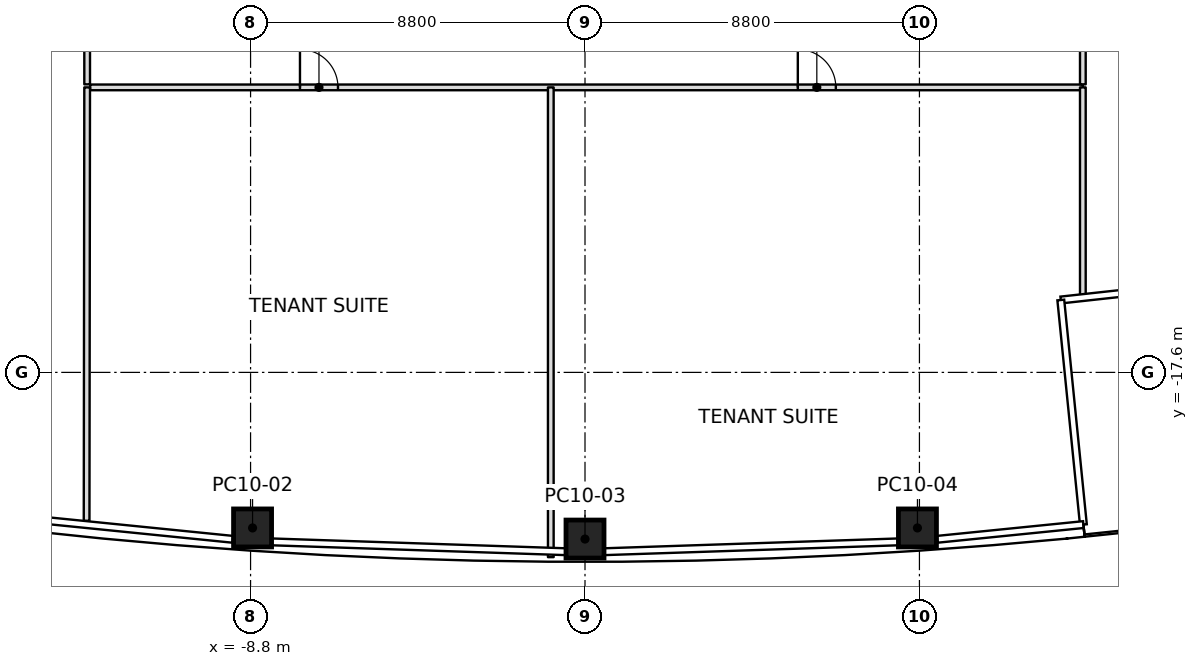
"""IFC4 building model, lengths in metres.
Left out: names, types, materials, properties, quantities, classifications, styles, units other than length and angle.
Written with IfcOpenShell. Run it as: python <this file> out.ifc"""

import sys

from ifc_helpers import new_model, si_unit, direction, frame, frame_2d, origin, origin_2d, place, context, subcontext, project, spatial, rectangle, extrude, clip, halfspace, element, fill, save


model = new_model("IFC4")
c1 = context("Model", 3, precision=1e-05, world=origin(), true_north=direction((0.0, 1.0)))
c2 = subcontext(c1, "Body", "Model", "MODEL_VIEW")
j1 = project(units=[si_unit("LENGTHUNIT", "METRE"), si_unit("PLANEANGLEUNIT", "RADIAN")], contexts=[c1])
p1 = place(None, origin())
s1 = spatial("IfcSite", under=j1, at=p1, CompositionType="ELEMENT")
p2 = place(p1, origin())
s2 = spatial("IfcBuilding", under=s1, at=p2, CompositionType="ELEMENT")
p3 = place(p2, frame((0.0, 0.0, 125.8)))
s3 = spatial("IfcBuildingStorey", under=s2, at=p3, CompositionType="ELEMENT", Elevation=125.8)
p4 = place(p3, frame((-8.748, -21.693, 0.0), z_axis=(0.008910223283, 0.011168293567, 0.999897933361), x_axis=(-0.997726322898, 0.066901914225, 0.008143615286)))
e1 = element("IfcColumn", 1, at=p4, inside=s3, PredefinedType="COLUMN", context=c2, shape_type="SweptSolid", body=[
    clip(extrude(rectangle(XDim=1.0, YDim=1.0, at=origin_2d()), origin(), (0.0, 0.0, 1.0), 4.0), halfspace(frame((0.0, 0.0, 0.002)), True)),
])
p5 = place(p3, frame((0.0, -21.986, 0.0), z_axis=(0.0, 0.01141283087, 0.999934871525), x_axis=(1.0, 0.0, 0.0)))
e2 = element("IfcColumn", 2, at=p5, inside=s3, PredefinedType="COLUMN", context=c2, shape_type="SweptSolid", body=[
    clip(extrude(rectangle(XDim=1.0, YDim=1.0, at=origin_2d()), origin(), (0.0, 0.0, 1.0), 4.0), halfspace(frame((0.0, 0.0, 0.002)), True)),
])
p6 = place(p3, frame((8.748, -21.693, 0.0), z_axis=(-0.008910223283, 0.011168293567, 0.999897933361), x_axis=(0.997726322898, 0.066901914225, 0.008143615286)))
e3 = element("IfcColumn", 3, at=p6, inside=s3, PredefinedType="COLUMN", context=c2, shape_type="SweptSolid", body=[
    clip(extrude(rectangle(XDim=1.0, YDim=1.0, at=origin_2d()), origin(), (0.0, 0.0, 1.0), 4.0), halfspace(frame((0.0, 0.0, 0.002)), True)),
])
p7 = place(p3, frame((-13.1, -10.1, 0.0), z_axis=(0.0, 0.0, 1.0), x_axis=(-0.001241543696, -0.999999229284, 0.0)))
e4 = element("IfcWall", 4, at=p7, inside=s3, PredefinedType="PARTITIONING", context=c2, shape_type="SweptSolid", body=[
    extrude(rectangle(XDim=11.405, YDim=0.15, at=frame_2d((5.703, 0.0))), origin(), (0.0, 0.0, 1.0), 3.234),
])
p8 = place(p3, frame((-0.9, -10.1, 0.0), z_axis=(0.0, 0.0, 1.0), x_axis=(0.0, -1.0, 0.0)))
e5 = element("IfcWall", 5, at=p8, inside=s3, PredefinedType="PARTITIONING", context=c2, shape_type="SweptSolid", body=[
    extrude(rectangle(XDim=12.362, YDim=0.15, at=frame_2d((6.181, 0.0))), origin(), (0.0, 0.0, 1.0), 3.234),
])
p9 = place(p3, frame((13.1, -10.1, 0.0), z_axis=(0.0, 0.0, 1.0), x_axis=(0.0, -1.0, 0.0)))
e6 = element("IfcWall", 6, at=p9, inside=s3, PredefinedType="PARTITIONING", context=c2, shape_type="SweptSolid", body=[
    extrude(rectangle(XDim=5.545, YDim=0.15, at=frame_2d((2.772, 0.0))), origin(), (0.0, 0.0, 1.0), 3.45),
])
p10 = place(p3, frame((-13.1, 10.02, 0.0), z_axis=(0.0, 0.0, 1.0), x_axis=(0.0, -1.0, 0.0)))
e7 = element("IfcWall", 7, at=p10, inside=s3, PredefinedType="PARTITIONING", context=c2, shape_type="SweptSolid", body=[
    extrude(rectangle(XDim=20.04, YDim=0.15, at=frame_2d((10.02, 0.0))), origin(), (0.0, 0.0, 1.0), 3.166),
])
p11 = place(p10, frame((2.52, 0.0, 0.0)))
e8 = element("IfcOpeningElement", 8, at=p11, cuts=e7, PredefinedType="OPENING", context=c2, shape_type="SweptSolid", body=[
    extrude(rectangle(XDim=1.0, YDim=2.1, at=frame_2d((0.5, 1.05))), frame((0.0, 0.075, 0.0), z_axis=(0.0, -1.0, 0.0), x_axis=(1.0, 0.0, 0.0)), (0.0, 0.0, 1.0), 0.15),
])
p12 = place(p10, frame((7.47, 0.0, 0.0)))
e9 = element("IfcOpeningElement", 9, at=p12, cuts=e7, PredefinedType="OPENING", context=c2, shape_type="SweptSolid", body=[
    extrude(rectangle(XDim=0.9, YDim=2.1, at=frame_2d((0.45, 1.05))), frame((0.0, 0.075, 0.0), z_axis=(0.0, -1.0, 0.0), x_axis=(1.0, 0.0, 0.0)), (0.0, 0.0, 1.0), 0.15),
])
p13 = place(p10, frame((14.48, 0.0, 0.0)))
e10 = element("IfcOpeningElement", 10, at=p13, cuts=e7, PredefinedType="OPENING", context=c2, shape_type="SweptSolid", body=[
    extrude(rectangle(XDim=1.0, YDim=2.1, at=frame_2d((0.5, 1.05))), frame((0.0, 0.075, 0.0), z_axis=(0.0, -1.0, 0.0), x_axis=(1.0, 0.0, 0.0)), (0.0, 0.0, 1.0), 0.15),
])
p14 = place(p3, frame((-13.02, -10.1, 0.0), z_axis=(0.0, 0.0, 1.0), x_axis=(1.0, 0.0, 0.0)))
e11 = element("IfcWall", 11, at=p14, inside=s3, PredefinedType="PARTITIONING", context=c2, shape_type="SweptSolid", body=[
    extrude(rectangle(XDim=26.12, YDim=0.15, at=frame_2d((13.06, 0.0))), origin(), (0.0, 0.0, 1.0), 3.317),
])
p15 = place(p14, frame((5.52, 0.0, 0.0)))
e12 = element("IfcOpeningElement", 12, at=p15, cuts=e11, PredefinedType="OPENING", context=c2, shape_type="SweptSolid", body=[
    extrude(rectangle(XDim=1.0, YDim=2.1, at=frame_2d((0.5, 1.05))), frame((0.0, 0.075, 0.0), z_axis=(0.0, -1.0, 0.0), x_axis=(1.0, 0.0, 0.0)), (0.0, 0.0, 1.0), 0.15),
])
p16 = place(p14, frame((18.62, 0.0, 0.0)))
e13 = element("IfcOpeningElement", 13, at=p16, cuts=e11, PredefinedType="OPENING", context=c2, shape_type="SweptSolid", body=[
    extrude(rectangle(XDim=1.0, YDim=2.1, at=frame_2d((0.5, 1.05))), frame((0.0, 0.075, 0.0), z_axis=(0.0, -1.0, 0.0), x_axis=(1.0, 0.0, 0.0)), (0.0, 0.0, 1.0), 0.15),
])
p17 = place(p3, frame((13.1, -10.02, 0.0), z_axis=(0.0, 0.0, 1.0), x_axis=(0.0, 1.0, 0.0)))
e14 = element("IfcWall", 14, at=p17, inside=s3, PredefinedType="PARTITIONING", context=c2, shape_type="SweptSolid", body=[
    extrude(rectangle(XDim=19.961, YDim=0.15, at=frame_2d((9.98, 0.0))), origin(), (0.0, 0.0, 1.0), 3.166),
])
p18 = place(p17, frame((12.461, 0.0, 0.0)))
e15 = element("IfcOpeningElement", 15, at=p18, cuts=e14, PredefinedType="OPENING", context=c2, shape_type="SweptSolid", body=[
    extrude(rectangle(XDim=1.0, YDim=2.1, at=frame_2d((0.5, 1.05))), frame((0.0, 0.075, 0.0), z_axis=(0.0, -1.0, 0.0), x_axis=(1.0, 0.0, 0.0)), (0.0, 0.0, 1.0), 0.15),
])
p19 = place(p17, frame((2.43, 0.0, 0.0)))
e16 = element("IfcOpeningElement", 16, at=p19, cuts=e14, PredefinedType="OPENING", context=c2, shape_type="SweptSolid", body=[
    extrude(rectangle(XDim=1.0, YDim=2.1, at=frame_2d((0.5, 1.05))), frame((0.0, 0.075, 0.0), z_axis=(0.0, -1.0, 0.0), x_axis=(1.0, 0.0, 0.0)), (0.0, 0.0, 1.0), 0.15),
])
p20 = place(p15, origin())
e17 = element("IfcDoor", 17, at=p20, inside=s3, OperationType="SINGLE_SWING_RIGHT", PredefinedType="DOOR", context=c2, shape_type="SweptSolid", body=[
    extrude(rectangle(XDim=1.0, YDim=2.1, at=frame_2d((0.5, 1.05))), frame((0.0, 0.025, 0.0), z_axis=(0.0, -1.0, 0.0), x_axis=(1.0, 0.0, 0.0)), (0.0, 0.0, 1.0), 0.05),
])
fill(e12, e17)
p21 = place(p16, origin())
e18 = element("IfcDoor", 18, at=p21, inside=s3, OperationType="SINGLE_SWING_RIGHT", PredefinedType="DOOR", context=c2, shape_type="SweptSolid", body=[
    extrude(rectangle(XDim=1.0, YDim=2.1, at=frame_2d((0.5, 1.05))), frame((0.0, 0.025, 0.0), z_axis=(0.0, -1.0, 0.0), x_axis=(1.0, 0.0, 0.0)), (0.0, 0.0, 1.0), 0.05),
])
fill(e13, e18)
save(model, sys.argv[1])
